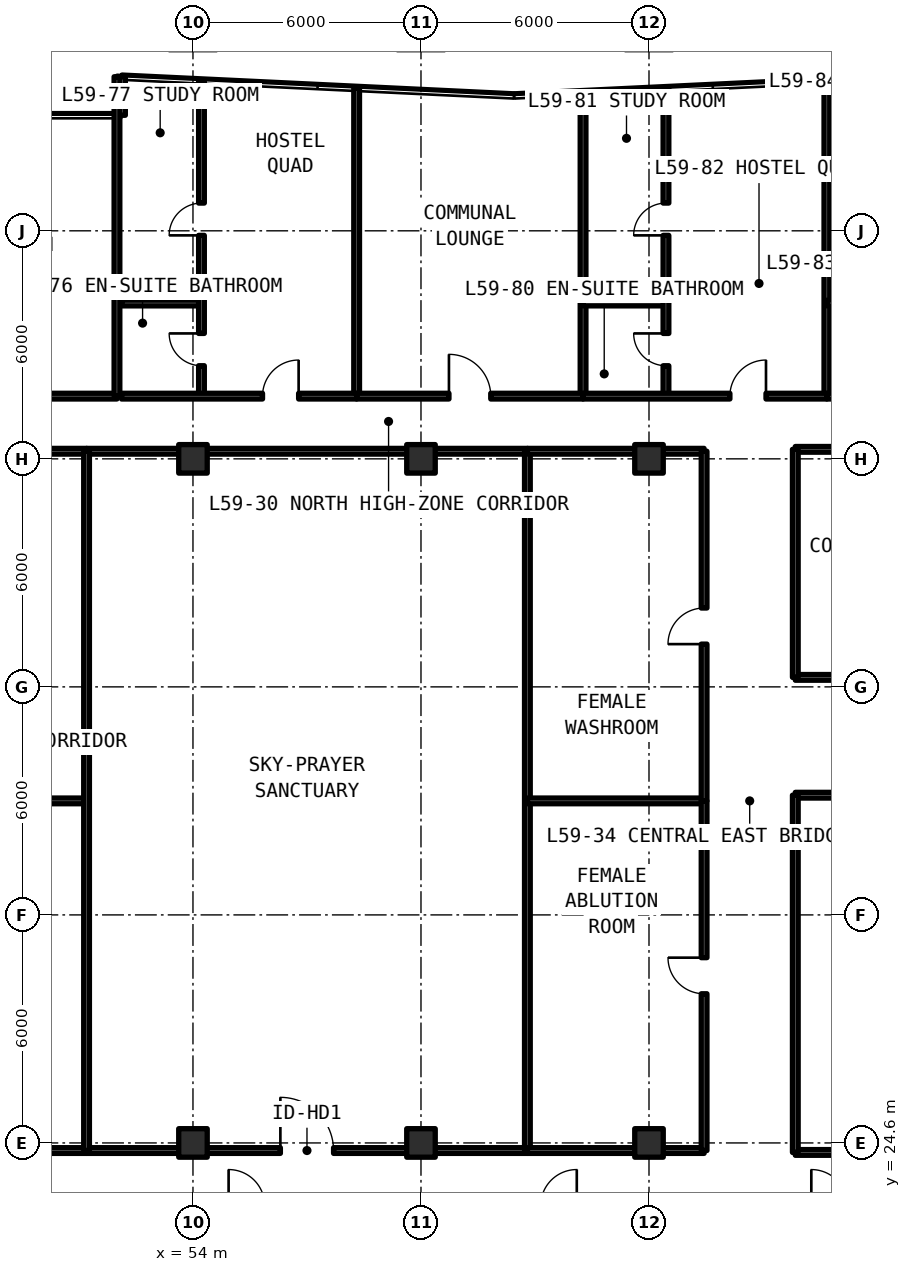
"""IFC4 building model, lengths in metres.
Left out: names, types, materials, properties, quantities, classifications, styles, units other than length and angle.
Written with IfcOpenShell. Run it as: python <this file> out.ifc"""

import sys

from ifc_helpers import new_model, si_unit, direction, frame, frame_2d, origin, origin_2d, place, context, subcontext, project, spatial, rectangle, extrude, element, fill, save


model = new_model("IFC4")
c1 = context("Model", 3, precision=1e-05, world=origin(), true_north=direction((0.0, 1.0)))
c2 = subcontext(c1, "Body", "Model", "MODEL_VIEW")
j1 = project(units=[si_unit("LENGTHUNIT", "METRE"), si_unit("PLANEANGLEUNIT", "RADIAN")], contexts=[c1])
p1 = place(None, origin())
s1 = spatial("IfcSite", under=j1, at=p1, CompositionType="ELEMENT")
p2 = place(p1, origin())
s2 = spatial("IfcBuilding", under=s1, at=p2, CompositionType="ELEMENT")
p3 = place(p2, frame((0.0, 0.0, 211.86)))
s3 = spatial("IfcBuildingStorey", under=s2, at=p3, CompositionType="ELEMENT", Elevation=211.86)
for number, where, z_axis, x_axis in (
    (1, (54.0, 24.6, 0.0), (0.0, 0.0, 1.0), (1.0, 0.0, 0.0)),
    (2, (54.0, 42.6, 0.0), (0.0, 0.0, 1.0), (1.0, 0.0, 0.0)),
    (3, (60.0, 24.6, 0.0), (0.0, 0.0, 1.0), (1.0, 0.0, 0.0)),
    (4, (60.0, 42.6, 0.0), (0.0, 0.0, 1.0), (1.0, 0.0, 0.0)),
    (5, (66.0, 24.6, 0.0), (0.0, 0.0, 1.0), (1.0, 0.0, 0.0)),
    (6, (66.0, 42.6, 0.0), (0.0, 0.0, 1.0), (1.0, 0.0, 0.0)),
):
    element("IfcColumn", number, at=place(p3, frame(where, z_axis=z_axis, x_axis=x_axis)), inside=s3, PredefinedType="COLUMN", context=c2, shape_type="SweptSolid", body=[
        extrude(rectangle(XDim=0.75, YDim=0.75, at=origin_2d()), origin(), (0.0, 0.0, 1.0), 3.63),
    ])
p4 = place(p3, frame((52.11, 52.655, 0.0), z_axis=(0.0, 0.0, 1.0), x_axis=(0.0, -1.0, 0.0)))
e7 = element("IfcWall", 7, at=p4, inside=s3, PredefinedType="SOLIDWALL", context=c2, shape_type="SweptSolid", body=[
    extrude(rectangle(XDim=1.015, YDim=0.22, at=frame_2d((0.507, 0.0))), origin(), (0.0, 0.0, 1.0), 3.41),
])
p5 = place(p3, frame((69.85, 24.35, 0.0), z_axis=(0.0, 0.0, 1.0), x_axis=(1.0, 0.0, 0.0)))
e8 = element("IfcWall", 8, at=p5, inside=s3, PredefinedType="SOLIDWALL", context=c2, shape_type="SweptSolid", body=[
    extrude(rectangle(XDim=7.905, YDim=0.15, at=frame_2d((3.952, 0.0))), origin(), (0.0, 0.0, 1.0), 2.63),
])
p6 = place(p3, frame((69.85, 33.75, 0.0), z_axis=(0.0, 0.0, 1.0), x_axis=(1.0, 0.0, 0.0)))
e9 = element("IfcWall", 9, at=p6, inside=s3, PredefinedType="SOLIDWALL", context=c2, shape_type="SweptSolid", body=[
    extrude(rectangle(XDim=7.905, YDim=0.15, at=frame_2d((3.952, 0.0))), origin(), (0.0, 0.0, 1.0), 2.63),
])
p7 = place(p6, frame((3.478, 0.0, 0.0)))
e10 = element("IfcOpeningElement", 10, at=p7, cuts=e9, PredefinedType="OPENING", context=c2, shape_type="SweptSolid", body=[
    extrude(rectangle(XDim=0.95, YDim=2.15, at=frame_2d((0.475, 1.075))), frame((0.0, 0.085, 0.0), z_axis=(0.0, -1.0, 0.0), x_axis=(1.0, 0.0, 0.0)), (0.0, 0.0, 1.0), 0.17),
])
p8 = place(p3, frame((69.85, 24.35, 0.0), z_axis=(0.0, 0.0, 1.0), x_axis=(0.0, 1.0, 0.0)))
e11 = element("IfcWall", 11, at=p8, inside=s3, PredefinedType="SOLIDWALL", context=c2, shape_type="SweptSolid", body=[
    extrude(rectangle(XDim=9.4, YDim=0.15, at=frame_2d((4.7, 0.0))), origin(), (0.0, 0.0, 1.0), 2.63),
])
p9 = place(p3, frame((69.85, 36.85, 0.0), z_axis=(0.0, 0.0, 1.0), x_axis=(1.0, 0.0, 0.0)))
e12 = element("IfcWall", 12, at=p9, inside=s3, PredefinedType="SOLIDWALL", context=c2, shape_type="SweptSolid", body=[
    extrude(rectangle(XDim=7.905, YDim=0.15, at=frame_2d((3.952, 0.0))), origin(), (0.0, 0.0, 1.0), 2.63),
])
p10 = place(p9, frame((3.478, 0.0, 0.0)))
e13 = element("IfcOpeningElement", 13, at=p10, cuts=e12, PredefinedType="OPENING", context=c2, shape_type="SweptSolid", body=[
    extrude(rectangle(XDim=0.95, YDim=2.15, at=frame_2d((0.475, 1.075))), frame((0.0, 0.085, 0.0), z_axis=(0.0, -1.0, 0.0), x_axis=(1.0, 0.0, 0.0)), (0.0, 0.0, 1.0), 0.17),
])
p11 = place(p3, frame((69.85, 42.85, 0.0), z_axis=(0.0, 0.0, 1.0), x_axis=(1.0, 0.0, 0.0)))
e14 = element("IfcWall", 14, at=p11, inside=s3, PredefinedType="SOLIDWALL", context=c2, shape_type="SweptSolid", body=[
    extrude(rectangle(XDim=7.905, YDim=0.15, at=frame_2d((3.952, 0.0))), origin(), (0.0, 0.0, 1.0), 2.63),
])
p12 = place(p3, frame((69.85, 36.85, 0.0), z_axis=(0.0, 0.0, 1.0), x_axis=(0.0, 1.0, 0.0)))
e15 = element("IfcWall", 15, at=p12, inside=s3, PredefinedType="SOLIDWALL", context=c2, shape_type="SweptSolid", body=[
    extrude(rectangle(XDim=6.0, YDim=0.15, at=frame_2d((3.0, 0.0))), origin(), (0.0, 0.0, 1.0), 2.63),
])
for number, where, z_axis, x_axis in (
    (16, (46.55, 24.4, 0.0), (0.0, 0.0, 1.0), (1.0, 0.0, 0.0)),
    (17, (46.55, 33.6, 0.0), (0.0, 0.0, 1.0), (1.0, 0.0, 0.0)),
    (18, (46.55, 42.8, 0.0), (0.0, 0.0, 1.0), (1.0, 0.0, 0.0)),
):
    element("IfcWall", number, at=place(p3, frame(where, z_axis=z_axis, x_axis=x_axis)), inside=s3, PredefinedType="SOLIDWALL", context=c2, shape_type="SweptSolid", body=[
        extrude(rectangle(XDim=4.65, YDim=0.15, at=frame_2d((2.325, 0.0))), origin(), (0.0, 0.0, 1.0), 2.63),
    ])
p13 = place(p3, frame((51.2, 24.4, 0.0), z_axis=(0.0, 0.0, 1.0), x_axis=(1.0, 0.0, 0.0)))
e19 = element("IfcWall", 19, at=p13, inside=s3, PredefinedType="SOLIDWALL", context=c2, shape_type="SweptSolid", body=[
    extrude(rectangle(XDim=11.6, YDim=0.15, at=frame_2d((5.8, 0.0))), origin(), (0.0, 0.0, 1.0), 2.63),
])
p14 = place(p13, frame((5.1, 0.0, 0.0)))
e20 = element("IfcOpeningElement", 20, at=p14, cuts=e19, PredefinedType="OPENING", context=c2, shape_type="SweptSolid", body=[
    extrude(rectangle(XDim=1.4, YDim=2.15, at=frame_2d((0.7, 1.075))), frame((0.0, 0.085, 0.0), z_axis=(0.0, -1.0, 0.0), x_axis=(1.0, 0.0, 0.0)), (0.0, 0.0, 1.0), 0.17),
])
p15 = place(p3, frame((51.2, 42.8, 0.0), z_axis=(0.0, 0.0, 1.0), x_axis=(1.0, 0.0, 0.0)))
e21 = element("IfcWall", 21, at=p15, inside=s3, PredefinedType="SOLIDWALL", context=c2, shape_type="SweptSolid", body=[
    extrude(rectangle(XDim=11.6, YDim=0.15, at=frame_2d((5.8, 0.0))), origin(), (0.0, 0.0, 1.0), 2.63),
])
for number, where, z_axis, x_axis in (
    (22, (51.2, 24.4, 0.0), (0.0, 0.0, 1.0), (0.0, 1.0, 0.0)),
    (23, (62.8, 24.4, 0.0), (0.0, 0.0, 1.0), (0.0, 1.0, 0.0)),
):
    element("IfcWall", number, at=place(p3, frame(where, z_axis=z_axis, x_axis=x_axis)), inside=s3, PredefinedType="SOLIDWALL", context=c2, shape_type="SweptSolid", body=[
        extrude(rectangle(XDim=18.4, YDim=0.15, at=frame_2d((9.2, 0.0))), origin(), (0.0, 0.0, 1.0), 2.63),
    ])
for number, where, z_axis, x_axis in (
    (24, (62.8, 24.4, 0.0), (0.0, 0.0, 1.0), (1.0, 0.0, 0.0)),
    (25, (62.8, 33.6, 0.0), (0.0, 0.0, 1.0), (1.0, 0.0, 0.0)),
):
    element("IfcWall", number, at=place(p3, frame(where, z_axis=z_axis, x_axis=x_axis)), inside=s3, PredefinedType="SOLIDWALL", context=c2, shape_type="SweptSolid", body=[
        extrude(rectangle(XDim=4.65, YDim=0.15, at=frame_2d((2.325, 0.0))), origin(), (0.0, 0.0, 1.0), 2.63),
    ])
p16 = place(p3, frame((67.45, 24.4, 0.0), z_axis=(0.0, 0.0, 1.0), x_axis=(0.0, 1.0, 0.0)))
e26 = element("IfcWall", 26, at=p16, inside=s3, PredefinedType="SOLIDWALL", context=c2, shape_type="SweptSolid", body=[
    extrude(rectangle(XDim=9.2, YDim=0.15, at=frame_2d((4.6, 0.0))), origin(), (0.0, 0.0, 1.0), 2.63),
])
p17 = place(p16, frame((4.125, 0.0, 0.0)))
e27 = element("IfcOpeningElement", 27, at=p17, cuts=e26, PredefinedType="OPENING", context=c2, shape_type="SweptSolid", body=[
    extrude(rectangle(XDim=0.95, YDim=2.15, at=frame_2d((0.475, 1.075))), frame((0.0, 0.085, 0.0), z_axis=(0.0, -1.0, 0.0), x_axis=(1.0, 0.0, 0.0)), (0.0, 0.0, 1.0), 0.17),
])
p18 = place(p3, frame((62.8, 42.8, 0.0), z_axis=(0.0, 0.0, 1.0), x_axis=(1.0, 0.0, 0.0)))
e28 = element("IfcWall", 28, at=p18, inside=s3, PredefinedType="SOLIDWALL", context=c2, shape_type="SweptSolid", body=[
    extrude(rectangle(XDim=4.65, YDim=0.15, at=frame_2d((2.325, 0.0))), origin(), (0.0, 0.0, 1.0), 2.63),
])
p19 = place(p3, frame((67.45, 33.6, 0.0), z_axis=(0.0, 0.0, 1.0), x_axis=(0.0, 1.0, 0.0)))
e29 = element("IfcWall", 29, at=p19, inside=s3, PredefinedType="SOLIDWALL", context=c2, shape_type="SweptSolid", body=[
    extrude(rectangle(XDim=9.2, YDim=0.15, at=frame_2d((4.6, 0.0))), origin(), (0.0, 0.0, 1.0), 2.63),
])
p20 = place(p19, frame((4.125, 0.0, 0.0)))
e30 = element("IfcOpeningElement", 30, at=p20, cuts=e29, PredefinedType="OPENING", context=c2, shape_type="SweptSolid", body=[
    extrude(rectangle(XDim=0.95, YDim=2.15, at=frame_2d((0.475, 1.075))), frame((0.0, 0.085, 0.0), z_axis=(0.0, -1.0, 0.0), x_axis=(1.0, 0.0, 0.0)), (0.0, 0.0, 1.0), 0.17),
])
p21 = place(p3, frame((43.6, 44.25, 0.0), z_axis=(0.0, 0.0, 1.0), x_axis=(1.0, 0.0, 0.0)))
e31 = element("IfcWall", 31, at=p21, inside=s3, PredefinedType="SOLIDWALL", context=c2, shape_type="SweptSolid", body=[
    extrude(rectangle(XDim=8.4, YDim=0.15, at=frame_2d((4.2, 0.0))), origin(), (0.0, 0.0, 1.0), 2.63),
])
p22 = place(p21, frame((2.3, 0.0, 0.0)))
e32 = element("IfcOpeningElement", 32, at=p22, cuts=e31, PredefinedType="OPENING", context=c2, shape_type="SweptSolid", body=[
    extrude(rectangle(XDim=1.1, YDim=2.15, at=frame_2d((0.55, 1.075))), frame((0.0, 0.085, 0.0), z_axis=(0.0, -1.0, 0.0), x_axis=(1.0, 0.0, 0.0)), (0.0, 0.0, 1.0), 0.17),
])
p23 = place(p3, frame((52.0, 44.25, 0.0), z_axis=(0.0, 0.0, 1.0), x_axis=(0.0, 1.0, 0.0)))
e33 = element("IfcWall", 33, at=p23, inside=s3, PredefinedType="SOLIDWALL", context=c2, shape_type="SweptSolid", body=[
    extrude(rectangle(XDim=8.404, YDim=0.15, at=frame_2d((4.202, 0.0))), origin(), (0.0, 0.0, 1.0), 2.63),
])
p24 = place(p3, frame((58.307, 44.25, 0.0), z_axis=(0.0, 0.0, 1.0), x_axis=(0.0, 1.0, 0.0)))
e34 = element("IfcWall", 34, at=p24, inside=s3, PredefinedType="SOLIDWALL", context=c2, shape_type="SweptSolid", body=[
    extrude(rectangle(XDim=8.108, YDim=0.15, at=frame_2d((4.054, 0.0))), origin(), (0.0, 0.0, 1.0), 2.63),
])
p25 = place(p3, frame((52.12, 46.7, 0.0), z_axis=(0.0, 0.0, 1.0), x_axis=(1.0, 0.0, 0.0)))
e35 = element("IfcWall", 35, at=p25, inside=s3, PredefinedType="PARTITIONING", context=c2, shape_type="SweptSolid", body=[
    extrude(rectangle(XDim=2.104, YDim=0.15, at=frame_2d((1.052, 0.0))), origin(), (0.0, 0.0, 1.0), 2.63),
])
p26 = place(p3, frame((54.224, 44.25, 0.0), z_axis=(0.0, 0.0, 1.0), x_axis=(0.0, 1.0, 0.0)))
e36 = element("IfcWall", 36, at=p26, inside=s3, PredefinedType="PARTITIONING", context=c2, shape_type="SweptSolid", body=[
    extrude(rectangle(XDim=8.303, YDim=0.15, at=frame_2d((4.152, 0.0))), origin(), (0.0, 0.0, 1.0), 2.63),
])
p27 = place(p26, frame((0.8, 0.0, 0.0)))
e37 = element("IfcOpeningElement", 37, at=p27, cuts=e36, PredefinedType="OPENING", context=c2, shape_type="SweptSolid", body=[
    extrude(rectangle(XDim=0.85, YDim=2.1, at=frame_2d((0.425, 1.05))), frame((0.0, 0.085, 0.0), z_axis=(0.0, -1.0, 0.0), x_axis=(1.0, 0.0, 0.0)), (0.0, 0.0, 1.0), 0.17),
])
p28 = place(p26, frame((4.23, 0.0, 0.0)))
e38 = element("IfcOpeningElement", 38, at=p28, cuts=e36, PredefinedType="OPENING", context=c2, shape_type="SweptSolid", body=[
    extrude(rectangle(XDim=0.85, YDim=2.1, at=frame_2d((0.425, 1.05))), frame((0.0, 0.085, 0.0), z_axis=(0.0, -1.0, 0.0), x_axis=(1.0, 0.0, 0.0)), (0.0, 0.0, 1.0), 0.17),
])
p29 = place(p3, frame((52.12, 44.25, 0.0), z_axis=(0.0, 0.0, 1.0), x_axis=(1.0, 0.0, 0.0)))
e39 = element("IfcWall", 39, at=p29, inside=s3, PredefinedType="SOLIDWALL", context=c2, shape_type="SweptSolid", body=[
    extrude(rectangle(XDim=6.187, YDim=0.15, at=frame_2d((3.093, 0.0))), origin(), (0.0, 0.0, 1.0), 2.63),
])
p30 = place(p29, frame((3.71, 0.0, 0.0)))
e40 = element("IfcOpeningElement", 40, at=p30, cuts=e39, PredefinedType="OPENING", context=c2, shape_type="SweptSolid", body=[
    extrude(rectangle(XDim=0.95, YDim=2.15, at=frame_2d((0.475, 1.075))), frame((0.0, 0.085, 0.0), z_axis=(0.0, -1.0, 0.0), x_axis=(1.0, 0.0, 0.0)), (0.0, 0.0, 1.0), 0.17),
])
p31 = place(p3, frame((64.265, 44.25, 0.0), z_axis=(0.0, 0.0, 1.0), x_axis=(0.0, 1.0, 0.0)))
e41 = element("IfcWall", 41, at=p31, inside=s3, PredefinedType="SOLIDWALL", context=c2, shape_type="SweptSolid", body=[
    extrude(rectangle(XDim=7.997, YDim=0.15, at=frame_2d((3.998, 0.0))), origin(), (0.0, 0.0, 1.0), 2.63),
])
p32 = place(p3, frame((58.307, 44.25, 0.0), z_axis=(0.0, 0.0, 1.0), x_axis=(1.0, 0.0, 0.0)))
e42 = element("IfcWall", 42, at=p32, inside=s3, PredefinedType="SOLIDWALL", context=c2, shape_type="SweptSolid", body=[
    extrude(rectangle(XDim=5.958, YDim=0.15, at=frame_2d((2.979, 0.0))), origin(), (0.0, 0.0, 1.0), 2.63),
])
p33 = place(p32, frame((2.429, 0.0, 0.0)))
e43 = element("IfcOpeningElement", 43, at=p33, cuts=e42, PredefinedType="OPENING", context=c2, shape_type="SweptSolid", body=[
    extrude(rectangle(XDim=1.1, YDim=2.15, at=frame_2d((0.55, 1.075))), frame((0.0, 0.085, 0.0), z_axis=(0.0, -1.0, 0.0), x_axis=(1.0, 0.0, 0.0)), (0.0, 0.0, 1.0), 0.17),
])
p34 = place(p3, frame((70.681, 44.25, 0.0), z_axis=(0.0, 0.0, 1.0), x_axis=(0.0, 1.0, 0.0)))
e44 = element("IfcWall", 44, at=p34, inside=s3, PredefinedType="SOLIDWALL", context=c2, shape_type="SweptSolid", body=[
    extrude(rectangle(XDim=8.304, YDim=0.15, at=frame_2d((4.152, 0.0))), origin(), (0.0, 0.0, 1.0), 2.63),
])
p35 = place(p3, frame((64.265, 46.7, 0.0), z_axis=(0.0, 0.0, 1.0), x_axis=(1.0, 0.0, 0.0)))
e45 = element("IfcWall", 45, at=p35, inside=s3, PredefinedType="PARTITIONING", context=c2, shape_type="SweptSolid", body=[
    extrude(rectangle(XDim=2.181, YDim=0.15, at=frame_2d((1.091, 0.0))), origin(), (0.0, 0.0, 1.0), 2.63),
])
p36 = place(p3, frame((66.446, 44.25, 0.0), z_axis=(0.0, 0.0, 1.0), x_axis=(0.0, 1.0, 0.0)))
e46 = element("IfcWall", 46, at=p36, inside=s3, PredefinedType="PARTITIONING", context=c2, shape_type="SweptSolid", body=[
    extrude(rectangle(XDim=8.101, YDim=0.15, at=frame_2d((4.051, 0.0))), origin(), (0.0, 0.0, 1.0), 2.63),
])
p37 = place(p36, frame((0.8, 0.0, 0.0)))
e47 = element("IfcOpeningElement", 47, at=p37, cuts=e46, PredefinedType="OPENING", context=c2, shape_type="SweptSolid", body=[
    extrude(rectangle(XDim=0.85, YDim=2.1, at=frame_2d((0.425, 1.05))), frame((0.0, 0.085, 0.0), z_axis=(0.0, -1.0, 0.0), x_axis=(1.0, 0.0, 0.0)), (0.0, 0.0, 1.0), 0.17),
])
p38 = place(p36, frame((4.23, 0.0, 0.0)))
e48 = element("IfcOpeningElement", 48, at=p38, cuts=e46, PredefinedType="OPENING", context=c2, shape_type="SweptSolid", body=[
    extrude(rectangle(XDim=0.85, YDim=2.1, at=frame_2d((0.425, 1.05))), frame((0.0, 0.085, 0.0), z_axis=(0.0, -1.0, 0.0), x_axis=(1.0, 0.0, 0.0)), (0.0, 0.0, 1.0), 0.17),
])
p39 = place(p3, frame((64.265, 44.25, 0.0), z_axis=(0.0, 0.0, 1.0), x_axis=(1.0, 0.0, 0.0)))
e49 = element("IfcWall", 49, at=p39, inside=s3, PredefinedType="SOLIDWALL", context=c2, shape_type="SweptSolid", body=[
    extrude(rectangle(XDim=6.416, YDim=0.15, at=frame_2d((3.208, 0.0))), origin(), (0.0, 0.0, 1.0), 2.63),
])
p40 = place(p39, frame((3.864, 0.0, 0.0)))
e50 = element("IfcOpeningElement", 50, at=p40, cuts=e49, PredefinedType="OPENING", context=c2, shape_type="SweptSolid", body=[
    extrude(rectangle(XDim=0.95, YDim=2.15, at=frame_2d((0.475, 1.075))), frame((0.0, 0.085, 0.0), z_axis=(0.0, -1.0, 0.0), x_axis=(1.0, 0.0, 0.0)), (0.0, 0.0, 1.0), 0.17),
])
p41 = place(p3, frame((70.681, 46.7, 0.0), z_axis=(0.0, 0.0, 1.0), x_axis=(1.0, 0.0, 0.0)))
e51 = element("IfcWall", 51, at=p41, inside=s3, PredefinedType="PARTITIONING", context=c2, shape_type="SweptSolid", body=[
    extrude(rectangle(XDim=2.026, YDim=0.15, at=frame_2d((1.013, 0.0))), origin(), (0.0, 0.0, 1.0), 2.63),
])
p42 = place(p3, frame((70.681, 44.25, 0.0), z_axis=(0.0, 0.0, 1.0), x_axis=(1.0, 0.0, 0.0)))
e52 = element("IfcWall", 52, at=p42, inside=s3, PredefinedType="SOLIDWALL", context=c2, shape_type="SweptSolid", body=[
    extrude(rectangle(XDim=5.958, YDim=0.15, at=frame_2d((2.979, 0.0))), origin(), (0.0, 0.0, 1.0), 2.63),
])
p43 = place(p42, frame((3.557, 0.0, 0.0)))
e53 = element("IfcOpeningElement", 53, at=p43, cuts=e52, PredefinedType="OPENING", context=c2, shape_type="SweptSolid", body=[
    extrude(rectangle(XDim=0.95, YDim=2.15, at=frame_2d((0.475, 1.075))), frame((0.0, 0.085, 0.0), z_axis=(0.0, -1.0, 0.0), x_axis=(1.0, 0.0, 0.0)), (0.0, 0.0, 1.0), 0.17),
])
p44 = place(p14, origin())
e54 = element("IfcDoor", 54, at=p44, inside=s3, OperationType="SINGLE_SWING_LEFT", PredefinedType="DOOR", context=c2, shape_type="SweptSolid", body=[
    extrude(rectangle(XDim=1.4, YDim=2.15, at=frame_2d((0.7, 1.075))), frame((0.0, 0.025, 0.0), z_axis=(0.0, -1.0, 0.0), x_axis=(1.0, 0.0, 0.0)), (0.0, 0.0, 1.0), 0.05),
])
fill(e20, e54)
p45 = place(p17, origin())
e55 = element("IfcDoor", 55, at=p45, inside=s3, OperationType="SINGLE_SWING_RIGHT", PredefinedType="DOOR", context=c2, shape_type="SweptSolid", body=[
    extrude(rectangle(XDim=0.95, YDim=2.15, at=frame_2d((0.475, 1.075))), frame((0.0, 0.025, 0.0), z_axis=(0.0, -1.0, 0.0), x_axis=(1.0, 0.0, 0.0)), (0.0, 0.0, 1.0), 0.05),
])
fill(e27, e55)
p46 = place(p20, origin())
e56 = element("IfcDoor", 56, at=p46, inside=s3, OperationType="SINGLE_SWING_LEFT", PredefinedType="DOOR", context=c2, shape_type="SweptSolid", body=[
    extrude(rectangle(XDim=0.95, YDim=2.15, at=frame_2d((0.475, 1.075))), frame((0.0, 0.025, 0.0), z_axis=(0.0, -1.0, 0.0), x_axis=(1.0, 0.0, 0.0)), (0.0, 0.0, 1.0), 0.05),
])
fill(e30, e56)
p47 = place(p27, origin())
e57 = element("IfcDoor", 57, at=p47, inside=s3, OperationType="SINGLE_SWING_RIGHT", PredefinedType="DOOR", context=c2, shape_type="SweptSolid", body=[
    extrude(rectangle(XDim=0.85, YDim=2.1, at=frame_2d((0.425, 1.05))), frame((0.0, 0.025, 0.0), z_axis=(0.0, -1.0, 0.0), x_axis=(1.0, 0.0, 0.0)), (0.0, 0.0, 1.0), 0.05),
])
fill(e37, e57)
p48 = place(p28, origin())
e58 = element("IfcDoor", 58, at=p48, inside=s3, OperationType="SINGLE_SWING_LEFT", PredefinedType="DOOR", context=c2, shape_type="SweptSolid", body=[
    extrude(rectangle(XDim=0.85, YDim=2.1, at=frame_2d((0.425, 1.05))), frame((0.0, 0.025, 0.0), z_axis=(0.0, -1.0, 0.0), x_axis=(1.0, 0.0, 0.0)), (0.0, 0.0, 1.0), 0.05),
])
fill(e38, e58)
p49 = place(p30, origin())
e59 = element("IfcDoor", 59, at=p49, inside=s3, OperationType="SINGLE_SWING_RIGHT", PredefinedType="DOOR", context=c2, shape_type="SweptSolid", body=[
    extrude(rectangle(XDim=0.95, YDim=2.15, at=frame_2d((0.475, 1.075))), frame((0.0, 0.025, 0.0), z_axis=(0.0, -1.0, 0.0), x_axis=(1.0, 0.0, 0.0)), (0.0, 0.0, 1.0), 0.05),
])
fill(e40, e59)
p50 = place(p33, origin())
e60 = element("IfcDoor", 60, at=p50, inside=s3, OperationType="SINGLE_SWING_LEFT", PredefinedType="DOOR", context=c2, shape_type="SweptSolid", body=[
    extrude(rectangle(XDim=1.1, YDim=2.15, at=frame_2d((0.55, 1.075))), frame((0.0, 0.025, 0.0), z_axis=(0.0, -1.0, 0.0), x_axis=(1.0, 0.0, 0.0)), (0.0, 0.0, 1.0), 0.05),
])
fill(e43, e60)
p51 = place(p37, origin())
e61 = element("IfcDoor", 61, at=p51, inside=s3, OperationType="SINGLE_SWING_RIGHT", PredefinedType="DOOR", context=c2, shape_type="SweptSolid", body=[
    extrude(rectangle(XDim=0.85, YDim=2.1, at=frame_2d((0.425, 1.05))), frame((0.0, 0.025, 0.0), z_axis=(0.0, -1.0, 0.0), x_axis=(1.0, 0.0, 0.0)), (0.0, 0.0, 1.0), 0.05),
])
fill(e47, e61)
p52 = place(p38, origin())
e62 = element("IfcDoor", 62, at=p52, inside=s3, OperationType="SINGLE_SWING_LEFT", PredefinedType="DOOR", context=c2, shape_type="SweptSolid", body=[
    extrude(rectangle(XDim=0.85, YDim=2.1, at=frame_2d((0.425, 1.05))), frame((0.0, 0.025, 0.0), z_axis=(0.0, -1.0, 0.0), x_axis=(1.0, 0.0, 0.0)), (0.0, 0.0, 1.0), 0.05),
])
fill(e48, e62)
p53 = place(p40, origin())
e63 = element("IfcDoor", 63, at=p53, inside=s3, OperationType="SINGLE_SWING_RIGHT", PredefinedType="DOOR", context=c2, shape_type="SweptSolid", body=[
    extrude(rectangle(XDim=0.95, YDim=2.15, at=frame_2d((0.475, 1.075))), frame((0.0, 0.025, 0.0), z_axis=(0.0, -1.0, 0.0), x_axis=(1.0, 0.0, 0.0)), (0.0, 0.0, 1.0), 0.05),
])
fill(e50, e63)
save(model, sys.argv[1])
